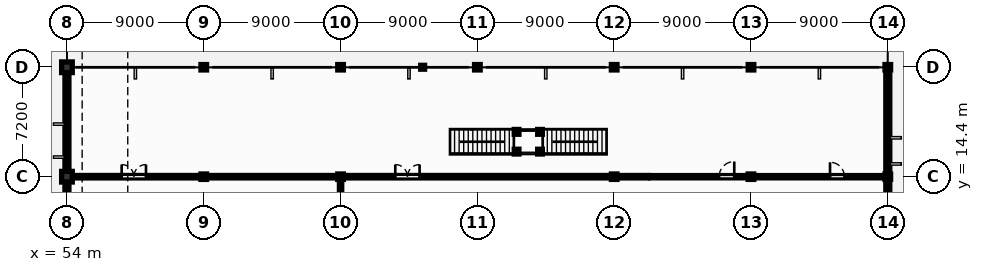
"""IFC4 building model, lengths in metres.
Left out: names, types, materials, properties, quantities, classifications, styles, units other than length and angle.
Written with IfcOpenShell. Run it as: python <this file> out.ifc"""

import sys

from ifc_helpers import new_model, si_unit, direction, frame, frame_2d, origin, origin_2d, place, context, subcontext, project, spatial, rectangle, hollow_rectangle, i_section, extrude, element, fill, save


model = new_model("IFC4")
c1 = context("Model", 3, precision=1e-05, world=origin(), true_north=direction((0.0, 1.0)))
c2 = subcontext(c1, "Body", "Model", "MODEL_VIEW")
j1 = project(units=[si_unit("LENGTHUNIT", "METRE"), si_unit("PLANEANGLEUNIT", "RADIAN")], contexts=[c1])
p1 = place(None, origin())
s1 = spatial("IfcSite", under=j1, at=p1, CompositionType="ELEMENT")
p2 = place(p1, origin())
s2 = spatial("IfcBuilding", under=s1, at=p2, CompositionType="ELEMENT")
p3 = place(p2, origin())
s3 = spatial("IfcBuildingStorey", under=s2, at=p3, CompositionType="ELEMENT", Elevation=0.0)
for number, where, z_axis, x_axis in (
    (1, (54.0, 14.4, 0.0), (0.0, 0.0, 1.0), (1.0, 0.0, 0.0)),
    (2, (54.0, 21.6, 0.0), (0.0, 0.0, 1.0), (1.0, 0.0, 0.0)),
):
    element("IfcColumn", number, at=place(p3, frame(where, z_axis=z_axis, x_axis=x_axis)), inside=s3, PredefinedType="COLUMN", context=c2, shape_type="SweptSolid", body=[
        extrude(rectangle(XDim=0.7, YDim=0.7, at=origin_2d()), origin(), (0.0, 0.0, 1.0), 5.1),
    ])
for number, where, z_axis, x_axis in (
    (3, (63.0, 14.4, 0.0), (0.0, 0.0, 1.0), (1.0, 0.0, 0.0)),
    (4, (63.0, 21.6, 0.0), (0.0, 0.0, 1.0), (1.0, 0.0, 0.0)),
    (5, (72.0, 14.4, 0.0), (0.0, 0.0, 1.0), (1.0, 0.0, 0.0)),
    (6, (72.0, 21.6, 0.0), (0.0, 0.0, 1.0), (1.0, 0.0, 0.0)),
    (7, (81.0, 21.6, 0.0), (0.0, 0.0, 1.0), (1.0, 0.0, 0.0)),
    (8, (90.0, 14.4, 0.0), (0.0, 0.0, 1.0), (1.0, 0.0, 0.0)),
    (9, (90.0, 21.6, 0.0), (0.0, 0.0, 1.0), (1.0, 0.0, 0.0)),
    (10, (99.0, 14.4, 0.0), (0.0, 0.0, 1.0), (1.0, 0.0, 0.0)),
    (11, (99.0, 21.6, 0.0), (0.0, 0.0, 1.0), (1.0, 0.0, 0.0)),
    (12, (108.0, 14.4, 0.0), (0.0, 0.0, 1.0), (1.0, 0.0, 0.0)),
    (13, (108.0, 21.6, 0.0), (0.0, 0.0, 1.0), (1.0, 0.0, 0.0)),
):
    element("IfcColumn", number, at=place(p3, frame(where, z_axis=z_axis, x_axis=x_axis)), inside=s3, PredefinedType="COLUMN", context=c2, shape_type="SweptSolid", body=[
        extrude(i_section(OverallWidth=0.368, OverallDepth=0.356, WebThickness=0.011, FlangeThickness=0.018, at=origin_2d()), origin(), (0.0, 0.0, 1.0), 5.1),
    ])
p4 = place(p3, frame((77.4, 21.6, 0.0), z_axis=(0.0, 0.0, 1.0), x_axis=(1.0, 0.0, 0.0)))
e14 = element("IfcColumn", 14, at=p4, inside=s3, PredefinedType="COLUMN", context=c2, shape_type="SweptSolid", body=[
    extrude(hollow_rectangle(XDim=0.254, YDim=0.254, WallThickness=0.012, at=origin_2d()), origin(), (0.0, 0.0, 1.0), 4.8),
])
for number, where, z_axis, x_axis in (
    (15, (83.58, 16.05, 0.0), (0.0, 0.0, 1.0), (1.0, 0.0, 0.0)),
    (16, (85.12, 16.05, 0.0), (0.0, 0.0, 1.0), (1.0, 0.0, 0.0)),
    (17, (83.58, 17.35, 0.0), (0.0, 0.0, 1.0), (1.0, 0.0, 0.0)),
    (18, (85.12, 17.35, 0.0), (0.0, 0.0, 1.0), (1.0, 0.0, 0.0)),
):
    element("IfcColumn", number, at=place(p3, frame(where, z_axis=z_axis, x_axis=x_axis)), inside=s3, PredefinedType="COLUMN", context=c2, shape_type="SweptSolid", body=[
        extrude(i_section(OverallWidth=0.307, OverallDepth=0.315, WebThickness=0.012, FlangeThickness=0.019, at=origin_2d()), origin(), (0.0, 0.0, 1.0), 2.33),
    ])
p5 = place(p3, frame((54.0, 0.0, 0.0), z_axis=(0.0, 0.0, 1.0), x_axis=(0.0, 1.0, 0.0)))
e19 = element("IfcWall", 19, at=p5, inside=s3, PredefinedType="SOLIDWALL", context=c2, shape_type="SweptSolid", body=[
    extrude(rectangle(XDim=21.6, YDim=0.26, at=frame_2d((10.8, 0.0))), origin(), (0.0, 0.0, 1.0), 3.955),
])
p6 = place(p5, frame((4.5, 0.0, 0.85)))
e20 = element("IfcOpeningElement", 20, at=p6, cuts=e19, PredefinedType="OPENING", context=c2, shape_type="SweptSolid", body=[
    extrude(rectangle(XDim=2.2, YDim=1.95, at=frame_2d((1.1, 0.975))), frame((0.0, 0.14, 0.0), z_axis=(0.0, -1.0, 0.0), x_axis=(1.0, 0.0, 0.0)), (0.0, 0.0, 1.0), 0.28),
])
p7 = place(p5, frame((15.85, 0.0, 0.85)))
e21 = element("IfcOpeningElement", 21, at=p7, cuts=e19, PredefinedType="OPENING", context=c2, shape_type="SweptSolid", body=[
    extrude(rectangle(XDim=1.85, YDim=1.75, at=frame_2d((0.925, 0.875))), frame((0.0, 0.14, 0.0), z_axis=(0.0, -1.0, 0.0), x_axis=(1.0, 0.0, 0.0)), (0.0, 0.0, 1.0), 0.28),
])
p8 = place(p3, frame((108.0, 0.0, 0.0), z_axis=(0.0, 0.0, 1.0), x_axis=(0.0, 1.0, 0.0)))
e22 = element("IfcWall", 22, at=p8, inside=s3, PredefinedType="SOLIDWALL", context=c2, shape_type="SweptSolid", body=[
    extrude(rectangle(XDim=21.6, YDim=0.26, at=frame_2d((10.8, 0.0))), origin(), (0.0, 0.0, 1.0), 4.363),
])
p9 = place(p8, frame((4.5, 0.0, 0.85)))
e23 = element("IfcOpeningElement", 23, at=p9, cuts=e22, PredefinedType="OPENING", context=c2, shape_type="SweptSolid", body=[
    extrude(rectangle(XDim=2.2, YDim=1.95, at=frame_2d((1.1, 0.975))), frame((0.0, 0.14, 0.0), z_axis=(0.0, -1.0, 0.0), x_axis=(1.0, 0.0, 0.0)), (0.0, 0.0, 1.0), 0.28),
])
p10 = place(p8, frame((15.4, 0.0, 0.85)))
e24 = element("IfcOpeningElement", 24, at=p10, cuts=e22, PredefinedType="OPENING", context=c2, shape_type="SweptSolid", body=[
    extrude(rectangle(XDim=1.4, YDim=1.8, at=frame_2d((0.7, 0.9))), frame((0.0, 0.14, 0.0), z_axis=(0.0, -1.0, 0.0), x_axis=(1.0, 0.0, 0.0)), (0.0, 0.0, 1.0), 0.28),
])
p11 = place(p3, frame((54.0, 14.4, 0.0), z_axis=(0.0, 0.0, 1.0), x_axis=(1.0, 0.0, 0.0)))
e25 = element("IfcWall", 25, at=p11, inside=s3, PredefinedType="PARTITIONING", context=c2, shape_type="SweptSolid", body=[
    extrude(rectangle(XDim=38.2, YDim=0.16, at=frame_2d((19.1, 0.0))), origin(), (0.0, 0.0, 1.0), 3.898),
])
p12 = place(p11, frame((3.6, 0.0, 0.0)))
e26 = element("IfcOpeningElement", 26, at=p12, cuts=e25, PredefinedType="OPENING", context=c2, shape_type="SweptSolid", body=[
    extrude(rectangle(XDim=1.6, YDim=2.2, at=frame_2d((0.8, 1.1))), frame((0.0, 0.09, 0.0), z_axis=(0.0, -1.0, 0.0), x_axis=(1.0, 0.0, 0.0)), (0.0, 0.0, 1.0), 0.18),
])
p13 = place(p11, frame((21.6, 0.0, 0.0)))
e27 = element("IfcOpeningElement", 27, at=p13, cuts=e25, PredefinedType="OPENING", context=c2, shape_type="SweptSolid", body=[
    extrude(rectangle(XDim=1.6, YDim=2.2, at=frame_2d((0.8, 1.1))), frame((0.0, 0.09, 0.0), z_axis=(0.0, -1.0, 0.0), x_axis=(1.0, 0.0, 0.0)), (0.0, 0.0, 1.0), 0.18),
])
p14 = place(p3, frame((72.0, 0.0, 0.0), z_axis=(0.0, 0.0, 1.0), x_axis=(0.0, 1.0, 0.0)))
e28 = element("IfcWall", 28, at=p14, inside=s3, PredefinedType="PARTITIONING", context=c2, shape_type="SweptSolid", body=[
    extrude(rectangle(XDim=14.4, YDim=0.15, at=frame_2d((7.2, 0.0))), origin(), (0.0, 0.0, 1.0), 4.363),
])
p15 = place(p3, frame((92.4, 14.4, 0.0), z_axis=(0.0, 0.0, 1.0), x_axis=(1.0, 0.0, 0.0)))
e29 = element("IfcWall", 29, at=p15, inside=s3, PredefinedType="PARTITIONING", context=c2, shape_type="SweptSolid", body=[
    extrude(rectangle(XDim=15.6, YDim=0.15, at=frame_2d((7.8, 0.0))), origin(), (0.0, 0.0, 1.0), 4.208),
])
p16 = place(p15, frame((4.5, 0.0, 0.0)))
e30 = element("IfcOpeningElement", 30, at=p16, cuts=e29, PredefinedType="OPENING", context=c2, shape_type="SweptSolid", body=[
    extrude(rectangle(XDim=1.0, YDim=2.15, at=frame_2d((0.5, 1.075))), frame((0.0, 0.085, 0.0), z_axis=(0.0, -1.0, 0.0), x_axis=(1.0, 0.0, 0.0)), (0.0, 0.0, 1.0), 0.17),
])
p17 = place(p15, frame((11.8, 0.0, 0.0)))
e31 = element("IfcOpeningElement", 31, at=p17, cuts=e29, PredefinedType="OPENING", context=c2, shape_type="SweptSolid", body=[
    extrude(rectangle(XDim=0.95, YDim=2.15, at=frame_2d((0.475, 1.075))), frame((0.0, 0.085, 0.0), z_axis=(0.0, -1.0, 0.0), x_axis=(1.0, 0.0, 0.0)), (0.0, 0.0, 1.0), 0.17),
])
p18 = place(p7, origin())
e32 = element("IfcWindow", 32, at=p18, inside=s3, PartitioningType="SINGLE_PANEL", PredefinedType="WINDOW", context=c2, shape_type="SweptSolid", body=[
    extrude(rectangle(XDim=1.85, YDim=1.75, at=frame_2d((0.925, 0.875))), frame((0.0, 0.03, 0.0), z_axis=(0.0, -1.0, 0.0), x_axis=(1.0, 0.0, 0.0)), (0.0, 0.0, 1.0), 0.06),
])
fill(e21, e32)
p19 = place(p10, origin())
e33 = element("IfcWindow", 33, at=p19, inside=s3, PartitioningType="SINGLE_PANEL", PredefinedType="WINDOW", context=c2, shape_type="SweptSolid", body=[
    extrude(rectangle(XDim=1.4, YDim=1.8, at=frame_2d((0.7, 0.9))), frame((0.0, 0.03, 0.0), z_axis=(0.0, -1.0, 0.0), x_axis=(1.0, 0.0, 0.0)), (0.0, 0.0, 1.0), 0.06),
])
fill(e24, e33)
p20 = place(p12, origin())
e34 = element("IfcDoor", 34, at=p20, inside=s3, OperationType="DOUBLE_DOOR_SINGLE_SWING", PredefinedType="DOOR", context=c2, shape_type="SweptSolid", body=[
    extrude(rectangle(XDim=1.6, YDim=2.2, at=frame_2d((0.8, 1.1))), frame((0.0, 0.025, 0.0), z_axis=(0.0, -1.0, 0.0), x_axis=(1.0, 0.0, 0.0)), (0.0, 0.0, 1.0), 0.05),
])
fill(e26, e34)
p21 = place(p13, origin())
e35 = element("IfcDoor", 35, at=p21, inside=s3, OperationType="DOUBLE_DOOR_SINGLE_SWING", PredefinedType="DOOR", context=c2, shape_type="SweptSolid", body=[
    extrude(rectangle(XDim=1.6, YDim=2.2, at=frame_2d((0.8, 1.1))), frame((0.0, 0.025, 0.0), z_axis=(0.0, -1.0, 0.0), x_axis=(1.0, 0.0, 0.0)), (0.0, 0.0, 1.0), 0.05),
])
fill(e27, e35)
p22 = place(p16, origin())
e36 = element("IfcDoor", 36, at=p22, inside=s3, OperationType="SINGLE_SWING_RIGHT", PredefinedType="DOOR", context=c2, shape_type="SweptSolid", body=[
    extrude(rectangle(XDim=1.0, YDim=2.15, at=frame_2d((0.5, 1.075))), frame((0.0, 0.025, 0.0), z_axis=(0.0, -1.0, 0.0), x_axis=(1.0, 0.0, 0.0)), (0.0, 0.0, 1.0), 0.05),
])
fill(e30, e36)
p23 = place(p17, origin())
e37 = element("IfcDoor", 37, at=p23, inside=s3, OperationType="SINGLE_SWING_LEFT", PredefinedType="DOOR", context=c2, shape_type="SweptSolid", body=[
    extrude(rectangle(XDim=0.95, YDim=2.15, at=frame_2d((0.475, 1.075))), frame((0.0, 0.025, 0.0), z_axis=(0.0, -1.0, 0.0), x_axis=(1.0, 0.0, 0.0)), (0.0, 0.0, 1.0), 0.05),
])
fill(e31, e37)
save(model, sys.argv[1])
